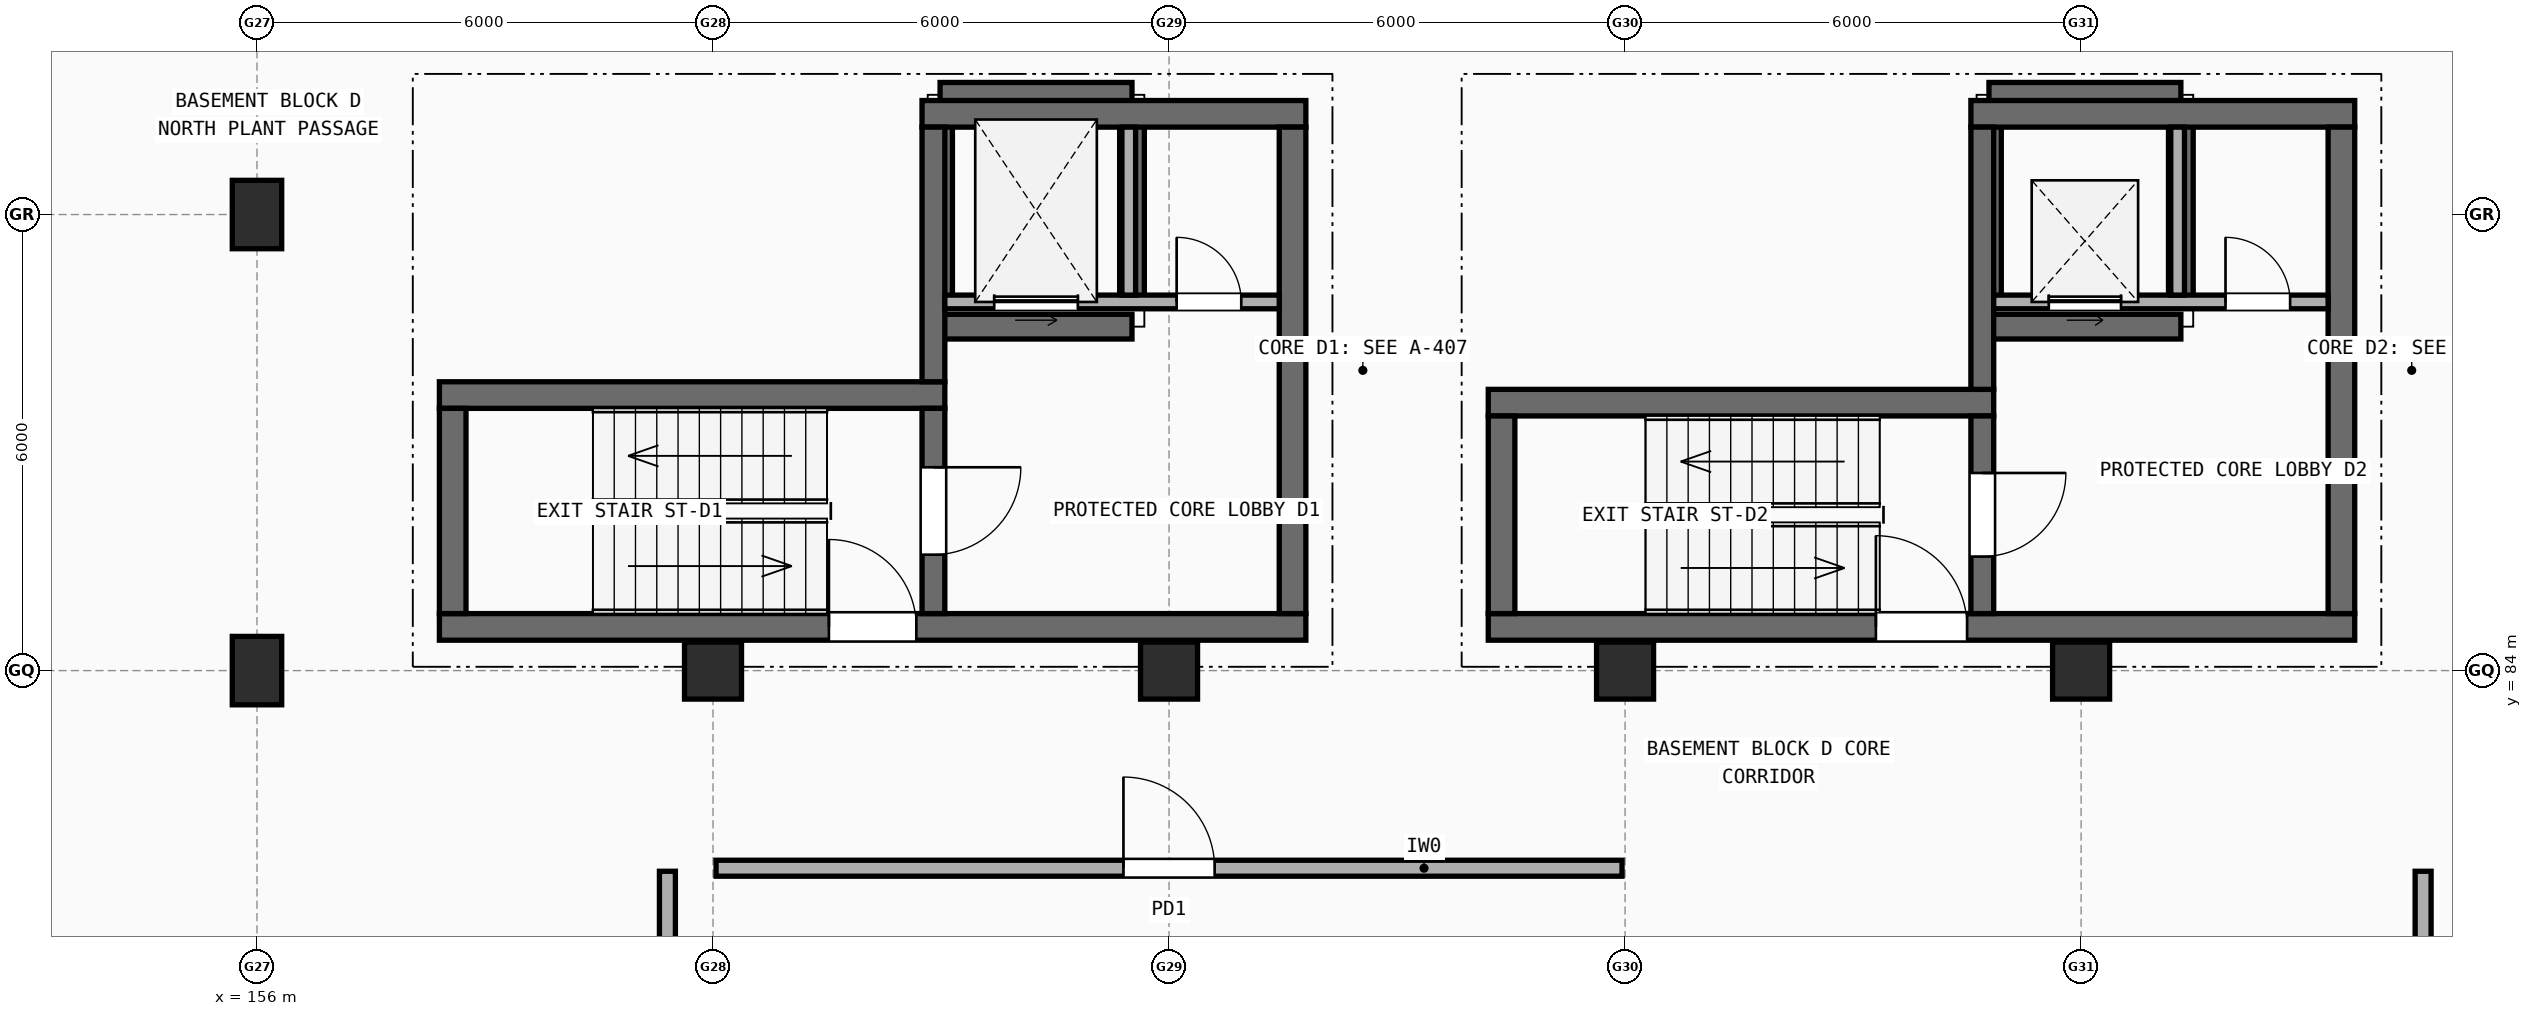
"""IFC4 building model, lengths in metres.
Left out: names, types, materials, properties, quantities, classifications, styles, units other than length and angle.
Written with IfcOpenShell. Run it as: python <this file> out.ifc"""

import sys

from ifc_helpers import new_model, si_unit, direction, frame, frame_2d, origin, origin_2d, place, context, subcontext, project, spatial, rectangle, extrude, element, fill, save


model = new_model("IFC4")
c1 = context("Model", 3, precision=1e-05, world=origin(), true_north=direction((0.0, 1.0)))
c2 = subcontext(c1, "Body", "Model", "MODEL_VIEW")
j1 = project(units=[si_unit("LENGTHUNIT", "METRE"), si_unit("PLANEANGLEUNIT", "RADIAN")], contexts=[c1])
p1 = place(None, origin())
s1 = spatial("IfcSite", under=j1, at=p1, CompositionType="ELEMENT")
p2 = place(p1, origin())
s2 = spatial("IfcBuilding", under=s1, at=p2, CompositionType="ELEMENT")
p3 = place(p2, frame((0.0, 0.0, -4.5)))
s3 = spatial("IfcBuildingStorey", under=s2, at=p3, CompositionType="ELEMENT", Elevation=-4.5)
p4 = place(p3, frame((164.988, 88.525, -1.1), z_axis=(0.0, 0.0, 1.0), x_axis=(1.0, 0.0, 0.0)))
e1 = element("IfcWall", 1, at=p4, inside=s3, PredefinedType="SHEAR", context=c2, shape_type="SweptSolid", body=[
    extrude(rectangle(XDim=2.525, YDim=0.325, at=frame_2d((1.262, 0.0))), origin(), (0.0, 0.0, 1.0), 1.1),
])
p5 = place(p3, frame((167.512, 88.85, -1.1), z_axis=(0.0, 0.0, 1.0), x_axis=(0.0, 1.0, 0.0)))
e2 = element("IfcWall", 2, at=p5, inside=s3, PredefinedType="SHEAR", context=c2, shape_type="SweptSolid", body=[
    extrude(rectangle(XDim=2.4, YDim=0.325, at=frame_2d((1.2, 0.0))), origin(), (0.0, 0.0, 1.0), 1.1),
])
p6 = place(p3, frame((167.512, 91.575, -1.1), z_axis=(0.0, 0.0, 1.0), x_axis=(-1.0, 0.0, 0.0)))
e3 = element("IfcWall", 3, at=p6, inside=s3, PredefinedType="SHEAR", context=c2, shape_type="SweptSolid", body=[
    extrude(rectangle(XDim=2.525, YDim=0.325, at=frame_2d((1.262, 0.0))), origin(), (0.0, 0.0, 1.0), 1.1),
])
p7 = place(p3, frame((164.988, 91.25, -1.1), z_axis=(0.0, 0.0, 1.0), x_axis=(0.0, -1.0, 0.0)))
e4 = element("IfcWall", 4, at=p7, inside=s3, PredefinedType="SHEAR", context=c2, shape_type="SweptSolid", body=[
    extrude(rectangle(XDim=2.4, YDim=0.325, at=frame_2d((1.2, 0.0))), origin(), (0.0, 0.0, 1.0), 1.1),
])
p8 = place(p3, frame((178.788, 88.525, -1.1), z_axis=(0.0, 0.0, 1.0), x_axis=(1.0, 0.0, 0.0)))
e5 = element("IfcWall", 5, at=p8, inside=s3, PredefinedType="SHEAR", context=c2, shape_type="SweptSolid", body=[
    extrude(rectangle(XDim=2.525, YDim=0.325, at=frame_2d((1.262, 0.0))), origin(), (0.0, 0.0, 1.0), 1.1),
])
p9 = place(p3, frame((181.312, 88.85, -1.1), z_axis=(0.0, 0.0, 1.0), x_axis=(0.0, 1.0, 0.0)))
e6 = element("IfcWall", 6, at=p9, inside=s3, PredefinedType="SHEAR", context=c2, shape_type="SweptSolid", body=[
    extrude(rectangle(XDim=2.4, YDim=0.325, at=frame_2d((1.2, 0.0))), origin(), (0.0, 0.0, 1.0), 1.1),
])
p10 = place(p3, frame((181.312, 91.575, -1.1), z_axis=(0.0, 0.0, 1.0), x_axis=(-1.0, 0.0, 0.0)))
e7 = element("IfcWall", 7, at=p10, inside=s3, PredefinedType="SHEAR", context=c2, shape_type="SweptSolid", body=[
    extrude(rectangle(XDim=2.525, YDim=0.325, at=frame_2d((1.262, 0.0))), origin(), (0.0, 0.0, 1.0), 1.1),
])
p11 = place(p3, frame((178.788, 91.25, -1.1), z_axis=(0.0, 0.0, 1.0), x_axis=(0.0, -1.0, 0.0)))
e8 = element("IfcWall", 8, at=p11, inside=s3, PredefinedType="SHEAR", context=c2, shape_type="SweptSolid", body=[
    extrude(rectangle(XDim=2.4, YDim=0.325, at=frame_2d((1.2, 0.0))), origin(), (0.0, 0.0, 1.0), 1.1),
])
for number, where, z_axis, x_axis in (
    (9, (156.0, 84.0, 0.0), (0.0, 0.0, 1.0), (1.0, 0.0, 0.0)),
    (10, (156.0, 90.0, 0.0), (0.0, 0.0, 1.0), (1.0, 0.0, 0.0)),
):
    element("IfcColumn", number, at=place(p3, frame(where, z_axis=z_axis, x_axis=x_axis)), inside=s3, PredefinedType="COLUMN", context=c2, shape_type="SweptSolid", body=[
        extrude(rectangle(XDim=0.65, YDim=0.9, at=origin_2d()), origin(), (0.0, 0.0, 1.0), 4.215),
    ])
for number, where, z_axis, x_axis in (
    (11, (162.0, 84.0, 0.0), (0.0, 0.0, 1.0), (1.0, 0.0, 0.0)),
    (12, (168.0, 84.0, 0.0), (0.0, 0.0, 1.0), (1.0, 0.0, 0.0)),
    (13, (174.0, 84.0, 0.0), (0.0, 0.0, 1.0), (1.0, 0.0, 0.0)),
    (14, (180.0, 84.0, 0.0), (0.0, 0.0, 1.0), (1.0, 0.0, 0.0)),
):
    element("IfcColumn", number, at=place(p3, frame(where, z_axis=z_axis, x_axis=x_axis)), inside=s3, PredefinedType="COLUMN", context=c2, shape_type="SweptSolid", body=[
        extrude(rectangle(XDim=0.75, YDim=0.75, at=origin_2d()), origin(), (0.0, 0.0, 1.0), 4.215),
    ])
p12 = place(p3, frame((158.4, 84.575, 0.0), z_axis=(0.0, 0.0, 1.0), x_axis=(1.0, 0.0, 0.0)))
e15 = element("IfcWall", 15, at=p12, inside=s3, PredefinedType="SHEAR", context=c2, shape_type="SweptSolid", body=[
    extrude(rectangle(XDim=11.4, YDim=0.35, at=frame_2d((5.7, 0.0))), origin(), (0.0, 0.0, 1.0), 4.215),
])
p13 = place(p12, frame((5.125, 0.0, 0.0)))
e16 = element("IfcOpeningElement", 16, at=p13, cuts=e15, PredefinedType="OPENING", context=c2, shape_type="SweptSolid", body=[
    extrude(rectangle(XDim=1.15, YDim=2.15, at=frame_2d((0.575, 1.075))), frame((0.0, 0.185, 0.0), z_axis=(0.0, -1.0, 0.0), x_axis=(1.0, 0.0, 0.0)), (0.0, 0.0, 1.0), 0.37),
])
p14 = place(p3, frame((165.05, 87.625, 0.0), z_axis=(0.0, 0.0, 1.0), x_axis=(-1.0, 0.0, 0.0)))
e17 = element("IfcWall", 17, at=p14, inside=s3, PredefinedType="SHEAR", context=c2, shape_type="SweptSolid", body=[
    extrude(rectangle(XDim=6.65, YDim=0.35, at=frame_2d((3.325, 0.0))), origin(), (0.0, 0.0, 1.0), 4.215),
])
p15 = place(p3, frame((158.575, 87.45, 0.0), z_axis=(0.0, 0.0, 1.0), x_axis=(0.0, -1.0, 0.0)))
e18 = element("IfcWall", 18, at=p15, inside=s3, PredefinedType="SHEAR", context=c2, shape_type="SweptSolid", body=[
    extrude(rectangle(XDim=2.7, YDim=0.35, at=frame_2d((1.35, 0.0))), origin(), (0.0, 0.0, 1.0), 4.215),
])
p16 = place(p3, frame((164.9, 84.75, 0.0), z_axis=(0.0, 0.0, 1.0), x_axis=(0.0, 1.0, 0.0)))
e19 = element("IfcWall", 19, at=p16, inside=s3, PredefinedType="SHEAR", context=c2, shape_type="SweptSolid", body=[
    extrude(rectangle(XDim=2.7, YDim=0.3, at=frame_2d((1.35, 0.0))), origin(), (0.0, 0.0, 1.0), 4.215),
])
p17 = place(p16, frame((0.775, 0.0, 0.0)))
e20 = element("IfcOpeningElement", 20, at=p17, cuts=e19, PredefinedType="OPENING", context=c2, shape_type="SweptSolid", body=[
    extrude(rectangle(XDim=1.15, YDim=2.15, at=frame_2d((0.575, 1.075))), frame((0.0, 0.16, 0.0), z_axis=(0.0, -1.0, 0.0), x_axis=(1.0, 0.0, 0.0)), (0.0, 0.0, 1.0), 0.32),
])
p18 = place(p3, frame((169.8, 91.325, 0.0), z_axis=(0.0, 0.0, 1.0), x_axis=(-1.0, 0.0, 0.0)))
e21 = element("IfcWall", 21, at=p18, inside=s3, PredefinedType="SHEAR", context=c2, shape_type="SweptSolid", body=[
    extrude(rectangle(XDim=5.05, YDim=0.35, at=frame_2d((2.525, 0.0))), origin(), (0.0, 0.0, 1.0), 4.215),
])
p19 = place(p3, frame((169.625, 84.75, 0.0), z_axis=(0.0, 0.0, 1.0), x_axis=(0.0, 1.0, 0.0)))
e22 = element("IfcWall", 22, at=p19, inside=s3, PredefinedType="SHEAR", context=c2, shape_type="SweptSolid", body=[
    extrude(rectangle(XDim=6.4, YDim=0.35, at=frame_2d((3.2, 0.0))), origin(), (0.0, 0.0, 1.0), 4.215),
])
p20 = place(p3, frame((164.9, 87.8, 0.0), z_axis=(0.0, 0.0, 1.0), x_axis=(0.0, 1.0, 0.0)))
e23 = element("IfcWall", 23, at=p20, inside=s3, PredefinedType="SHEAR", context=c2, shape_type="SweptSolid", body=[
    extrude(rectangle(XDim=3.35, YDim=0.3, at=frame_2d((1.675, 0.0))), origin(), (0.0, 0.0, 1.0), 4.215),
])
p21 = place(p3, frame((165.05, 88.85, 0.0), z_axis=(0.0, 0.0, 1.0), x_axis=(1.0, 0.0, 0.0)))
e24 = element("IfcWall", 24, at=p21, inside=s3, PredefinedType="SOLIDWALL", context=c2, shape_type="SweptSolid", body=[
    extrude(rectangle(XDim=4.4, YDim=0.18, at=frame_2d((2.2, 0.0))), origin(), (0.0, 0.0, 1.0), 4.215),
])
p22 = place(p21, frame((0.65, 0.0, 0.0)))
e25 = element("IfcOpeningElement", 25, at=p22, cuts=e24, PredefinedType="OPENING", context=c2, shape_type="SweptSolid", body=[
    extrude(rectangle(XDim=1.1, YDim=2.15, at=frame_2d((0.55, 1.075))), frame((0.0, 0.1, 0.0), z_axis=(0.0, -1.0, 0.0), x_axis=(1.0, 0.0, 0.0)), (0.0, 0.0, 1.0), 0.2),
])
p23 = place(p21, frame((3.05, 0.0, 0.0)))
e26 = element("IfcOpeningElement", 26, at=p23, cuts=e24, PredefinedType="OPENING", context=c2, shape_type="SweptSolid", body=[
    extrude(rectangle(XDim=0.85, YDim=2.1, at=frame_2d((0.425, 1.05))), frame((0.0, 0.1, 0.0), z_axis=(0.0, -1.0, 0.0), x_axis=(1.0, 0.0, 0.0)), (0.0, 0.0, 1.0), 0.2),
])
p24 = place(p3, frame((167.47, 88.94, 0.0), z_axis=(0.0, 0.0, 1.0), x_axis=(0.0, 1.0, 0.0)))
e27 = element("IfcWall", 27, at=p24, inside=s3, PredefinedType="SOLIDWALL", context=c2, shape_type="SweptSolid", body=[
    extrude(rectangle(XDim=2.21, YDim=0.18, at=frame_2d((1.105, 0.0))), origin(), (0.0, 0.0, 1.0), 4.215),
])
p25 = place(p3, frame((172.2, 84.575, 0.0), z_axis=(0.0, 0.0, 1.0), x_axis=(1.0, 0.0, 0.0)))
e28 = element("IfcWall", 28, at=p25, inside=s3, PredefinedType="SHEAR", context=c2, shape_type="SweptSolid", body=[
    extrude(rectangle(XDim=11.4, YDim=0.35, at=frame_2d((5.7, 0.0))), origin(), (0.0, 0.0, 1.0), 4.215),
])
p26 = place(p25, frame((5.1, 0.0, 0.0)))
e29 = element("IfcOpeningElement", 29, at=p26, cuts=e28, PredefinedType="OPENING", context=c2, shape_type="SweptSolid", body=[
    extrude(rectangle(XDim=1.2, YDim=2.15, at=frame_2d((0.6, 1.075))), frame((0.0, 0.185, 0.0), z_axis=(0.0, -1.0, 0.0), x_axis=(1.0, 0.0, 0.0)), (0.0, 0.0, 1.0), 0.37),
])
p27 = place(p3, frame((178.85, 87.525, 0.0), z_axis=(0.0, 0.0, 1.0), x_axis=(-1.0, 0.0, 0.0)))
e30 = element("IfcWall", 30, at=p27, inside=s3, PredefinedType="SHEAR", context=c2, shape_type="SweptSolid", body=[
    extrude(rectangle(XDim=6.65, YDim=0.35, at=frame_2d((3.325, 0.0))), origin(), (0.0, 0.0, 1.0), 4.215),
])
p28 = place(p3, frame((172.375, 87.35, 0.0), z_axis=(0.0, 0.0, 1.0), x_axis=(0.0, -1.0, 0.0)))
e31 = element("IfcWall", 31, at=p28, inside=s3, PredefinedType="SHEAR", context=c2, shape_type="SweptSolid", body=[
    extrude(rectangle(XDim=2.6, YDim=0.35, at=frame_2d((1.3, 0.0))), origin(), (0.0, 0.0, 1.0), 4.215),
])
p29 = place(p3, frame((178.7, 84.75, 0.0), z_axis=(0.0, 0.0, 1.0), x_axis=(0.0, 1.0, 0.0)))
e32 = element("IfcWall", 32, at=p29, inside=s3, PredefinedType="SHEAR", context=c2, shape_type="SweptSolid", body=[
    extrude(rectangle(XDim=2.6, YDim=0.3, at=frame_2d((1.3, 0.0))), origin(), (0.0, 0.0, 1.0), 4.215),
])
p30 = place(p29, frame((0.75, 0.0, 0.0)))
e33 = element("IfcOpeningElement", 33, at=p30, cuts=e32, PredefinedType="OPENING", context=c2, shape_type="SweptSolid", body=[
    extrude(rectangle(XDim=1.1, YDim=2.15, at=frame_2d((0.55, 1.075))), frame((0.0, 0.16, 0.0), z_axis=(0.0, -1.0, 0.0), x_axis=(1.0, 0.0, 0.0)), (0.0, 0.0, 1.0), 0.32),
])
p31 = place(p3, frame((183.6, 91.325, 0.0), z_axis=(0.0, 0.0, 1.0), x_axis=(-1.0, 0.0, 0.0)))
e34 = element("IfcWall", 34, at=p31, inside=s3, PredefinedType="SHEAR", context=c2, shape_type="SweptSolid", body=[
    extrude(rectangle(XDim=5.05, YDim=0.35, at=frame_2d((2.525, 0.0))), origin(), (0.0, 0.0, 1.0), 4.215),
])
p32 = place(p3, frame((183.425, 84.75, 0.0), z_axis=(0.0, 0.0, 1.0), x_axis=(0.0, 1.0, 0.0)))
e35 = element("IfcWall", 35, at=p32, inside=s3, PredefinedType="SHEAR", context=c2, shape_type="SweptSolid", body=[
    extrude(rectangle(XDim=6.4, YDim=0.35, at=frame_2d((3.2, 0.0))), origin(), (0.0, 0.0, 1.0), 4.215),
])
p33 = place(p3, frame((178.7, 87.7, 0.0), z_axis=(0.0, 0.0, 1.0), x_axis=(0.0, 1.0, 0.0)))
e36 = element("IfcWall", 36, at=p33, inside=s3, PredefinedType="SHEAR", context=c2, shape_type="SweptSolid", body=[
    extrude(rectangle(XDim=3.45, YDim=0.3, at=frame_2d((1.725, 0.0))), origin(), (0.0, 0.0, 1.0), 4.215),
])
p34 = place(p3, frame((178.85, 88.85, 0.0), z_axis=(0.0, 0.0, 1.0), x_axis=(1.0, 0.0, 0.0)))
e37 = element("IfcWall", 37, at=p34, inside=s3, PredefinedType="SOLIDWALL", context=c2, shape_type="SweptSolid", body=[
    extrude(rectangle(XDim=4.4, YDim=0.18, at=frame_2d((2.2, 0.0))), origin(), (0.0, 0.0, 1.0), 4.215),
])
p35 = place(p34, frame((0.725, 0.0, 0.0)))
e38 = element("IfcOpeningElement", 38, at=p35, cuts=e37, PredefinedType="OPENING", context=c2, shape_type="SweptSolid", body=[
    extrude(rectangle(XDim=0.95, YDim=2.15, at=frame_2d((0.475, 1.075))), frame((0.0, 0.1, 0.0), z_axis=(0.0, -1.0, 0.0), x_axis=(1.0, 0.0, 0.0)), (0.0, 0.0, 1.0), 0.2),
])
p36 = place(p34, frame((3.05, 0.0, 0.0)))
e39 = element("IfcOpeningElement", 39, at=p36, cuts=e37, PredefinedType="OPENING", context=c2, shape_type="SweptSolid", body=[
    extrude(rectangle(XDim=0.85, YDim=2.1, at=frame_2d((0.425, 1.05))), frame((0.0, 0.1, 0.0), z_axis=(0.0, -1.0, 0.0), x_axis=(1.0, 0.0, 0.0)), (0.0, 0.0, 1.0), 0.2),
])
p37 = place(p3, frame((181.27, 88.94, 0.0), z_axis=(0.0, 0.0, 1.0), x_axis=(0.0, 1.0, 0.0)))
e40 = element("IfcWall", 40, at=p37, inside=s3, PredefinedType="SOLIDWALL", context=c2, shape_type="SweptSolid", body=[
    extrude(rectangle(XDim=2.21, YDim=0.18, at=frame_2d((1.105, 0.0))), origin(), (0.0, 0.0, 1.0), 4.215),
])
p38 = place(p3, frame((162.04, 81.4, 0.0), z_axis=(0.0, 0.0, 1.0), x_axis=(1.0, 0.0, 0.0)))
e41 = element("IfcWall", 41, at=p38, inside=s3, PredefinedType="SOLIDWALL", context=c2, shape_type="SweptSolid", body=[
    extrude(rectangle(XDim=11.92, YDim=0.21, at=frame_2d((5.96, 0.0))), origin(), (0.0, 0.0, 1.0), 3.497),
])
p39 = place(p38, frame((5.36, 0.0, 0.0)))
e42 = element("IfcOpeningElement", 42, at=p39, cuts=e41, PredefinedType="OPENING", context=c2, shape_type="SweptSolid", body=[
    extrude(rectangle(XDim=1.2, YDim=2.15, at=frame_2d((0.6, 1.075))), frame((0.0, 0.115, 0.0), z_axis=(0.0, -1.0, 0.0), x_axis=(1.0, 0.0, 0.0)), (0.0, 0.0, 1.0), 0.23),
])
for number, where, z_axis, x_axis in (
    (43, (184.5, 66.04, 0.0), (0.0, 0.0, 1.0), (0.0, 1.0, 0.0)),
    (44, (161.4, 81.36, 0.0), (0.0, 0.0, 1.0), (0.0, -1.0, 0.0)),
):
    element("IfcWall", number, at=place(p3, frame(where, z_axis=z_axis, x_axis=x_axis)), inside=s3, PredefinedType="SOLIDWALL", context=c2, shape_type="SweptSolid", body=[
        extrude(rectangle(XDim=15.32, YDim=0.21, at=frame_2d((7.66, 0.0))), origin(), (0.0, 0.0, 1.0), 3.447),
    ])
p40 = place(p13, origin())
e45 = element("IfcDoor", 45, at=p40, inside=s3, OperationType="SINGLE_SWING_LEFT", PredefinedType="DOOR", context=c2, shape_type="SweptSolid", body=[
    extrude(rectangle(XDim=1.15, YDim=2.15, at=frame_2d((0.575, 1.075))), frame((0.0, 0.025, 0.0), z_axis=(0.0, -1.0, 0.0), x_axis=(1.0, 0.0, 0.0)), (0.0, 0.0, 1.0), 0.05),
])
fill(e16, e45)
p41 = place(p17, origin())
e46 = element("IfcDoor", 46, at=p41, inside=s3, OperationType="SINGLE_SWING_RIGHT", PredefinedType="DOOR", context=c2, shape_type="SweptSolid", body=[
    extrude(rectangle(XDim=1.15, YDim=2.15, at=frame_2d((0.575, 1.075))), frame((0.0, 0.025, 0.0), z_axis=(0.0, -1.0, 0.0), x_axis=(1.0, 0.0, 0.0)), (0.0, 0.0, 1.0), 0.05),
])
fill(e20, e46)
p42 = place(p22, origin())
e47 = element("IfcDoor", 47, at=p42, inside=s3, OperationType="SLIDING_TO_LEFT", PredefinedType="DOOR", context=c2, shape_type="SweptSolid", body=[
    extrude(rectangle(XDim=1.1, YDim=2.15, at=frame_2d((0.55, 1.075))), frame((0.0, 0.025, 0.0), z_axis=(0.0, -1.0, 0.0), x_axis=(1.0, 0.0, 0.0)), (0.0, 0.0, 1.0), 0.05),
])
fill(e25, e47)
p43 = place(p23, frame((0.85, 0.0, 0.0), z_axis=(0.0, 0.0, 1.0), x_axis=(-1.0, 0.0, 0.0)))
e48 = element("IfcDoor", 48, at=p43, inside=s3, OperationType="SINGLE_SWING_LEFT", PredefinedType="DOOR", context=c2, shape_type="SweptSolid", body=[
    extrude(rectangle(XDim=0.85, YDim=2.1, at=frame_2d((0.425, 1.05))), frame((0.0, 0.025, 0.0), z_axis=(0.0, -1.0, 0.0), x_axis=(1.0, 0.0, 0.0)), (0.0, 0.0, 1.0), 0.05),
])
fill(e26, e48)
p44 = place(p26, origin())
e49 = element("IfcDoor", 49, at=p44, inside=s3, OperationType="SINGLE_SWING_LEFT", PredefinedType="DOOR", context=c2, shape_type="SweptSolid", body=[
    extrude(rectangle(XDim=1.2, YDim=2.15, at=frame_2d((0.6, 1.075))), frame((0.0, 0.025, 0.0), z_axis=(0.0, -1.0, 0.0), x_axis=(1.0, 0.0, 0.0)), (0.0, 0.0, 1.0), 0.05),
])
fill(e29, e49)
p45 = place(p30, origin())
e50 = element("IfcDoor", 50, at=p45, inside=s3, OperationType="SINGLE_SWING_RIGHT", PredefinedType="DOOR", context=c2, shape_type="SweptSolid", body=[
    extrude(rectangle(XDim=1.1, YDim=2.15, at=frame_2d((0.55, 1.075))), frame((0.0, 0.025, 0.0), z_axis=(0.0, -1.0, 0.0), x_axis=(1.0, 0.0, 0.0)), (0.0, 0.0, 1.0), 0.05),
])
fill(e33, e50)
p46 = place(p35, origin())
e51 = element("IfcDoor", 51, at=p46, inside=s3, OperationType="SLIDING_TO_LEFT", PredefinedType="DOOR", context=c2, shape_type="SweptSolid", body=[
    extrude(rectangle(XDim=0.95, YDim=2.15, at=frame_2d((0.475, 1.075))), frame((0.0, 0.025, 0.0), z_axis=(0.0, -1.0, 0.0), x_axis=(1.0, 0.0, 0.0)), (0.0, 0.0, 1.0), 0.05),
])
fill(e38, e51)
p47 = place(p36, frame((0.85, 0.0, 0.0), z_axis=(0.0, 0.0, 1.0), x_axis=(-1.0, 0.0, 0.0)))
e52 = element("IfcDoor", 52, at=p47, inside=s3, OperationType="SINGLE_SWING_LEFT", PredefinedType="DOOR", context=c2, shape_type="SweptSolid", body=[
    extrude(rectangle(XDim=0.85, YDim=2.1, at=frame_2d((0.425, 1.05))), frame((0.0, 0.025, 0.0), z_axis=(0.0, -1.0, 0.0), x_axis=(1.0, 0.0, 0.0)), (0.0, 0.0, 1.0), 0.05),
])
fill(e39, e52)
p48 = place(p39, origin())
e53 = element("IfcDoor", 53, at=p48, inside=s3, OperationType="SINGLE_SWING_LEFT", PredefinedType="DOOR", context=c2, shape_type="SweptSolid", body=[
    extrude(rectangle(XDim=1.2, YDim=2.15, at=frame_2d((0.6, 1.075))), frame((0.0, 0.025, 0.0), z_axis=(0.0, -1.0, 0.0), x_axis=(1.0, 0.0, 0.0)), (0.0, 0.0, 1.0), 0.05),
])
fill(e42, e53)
save(model, sys.argv[1])
